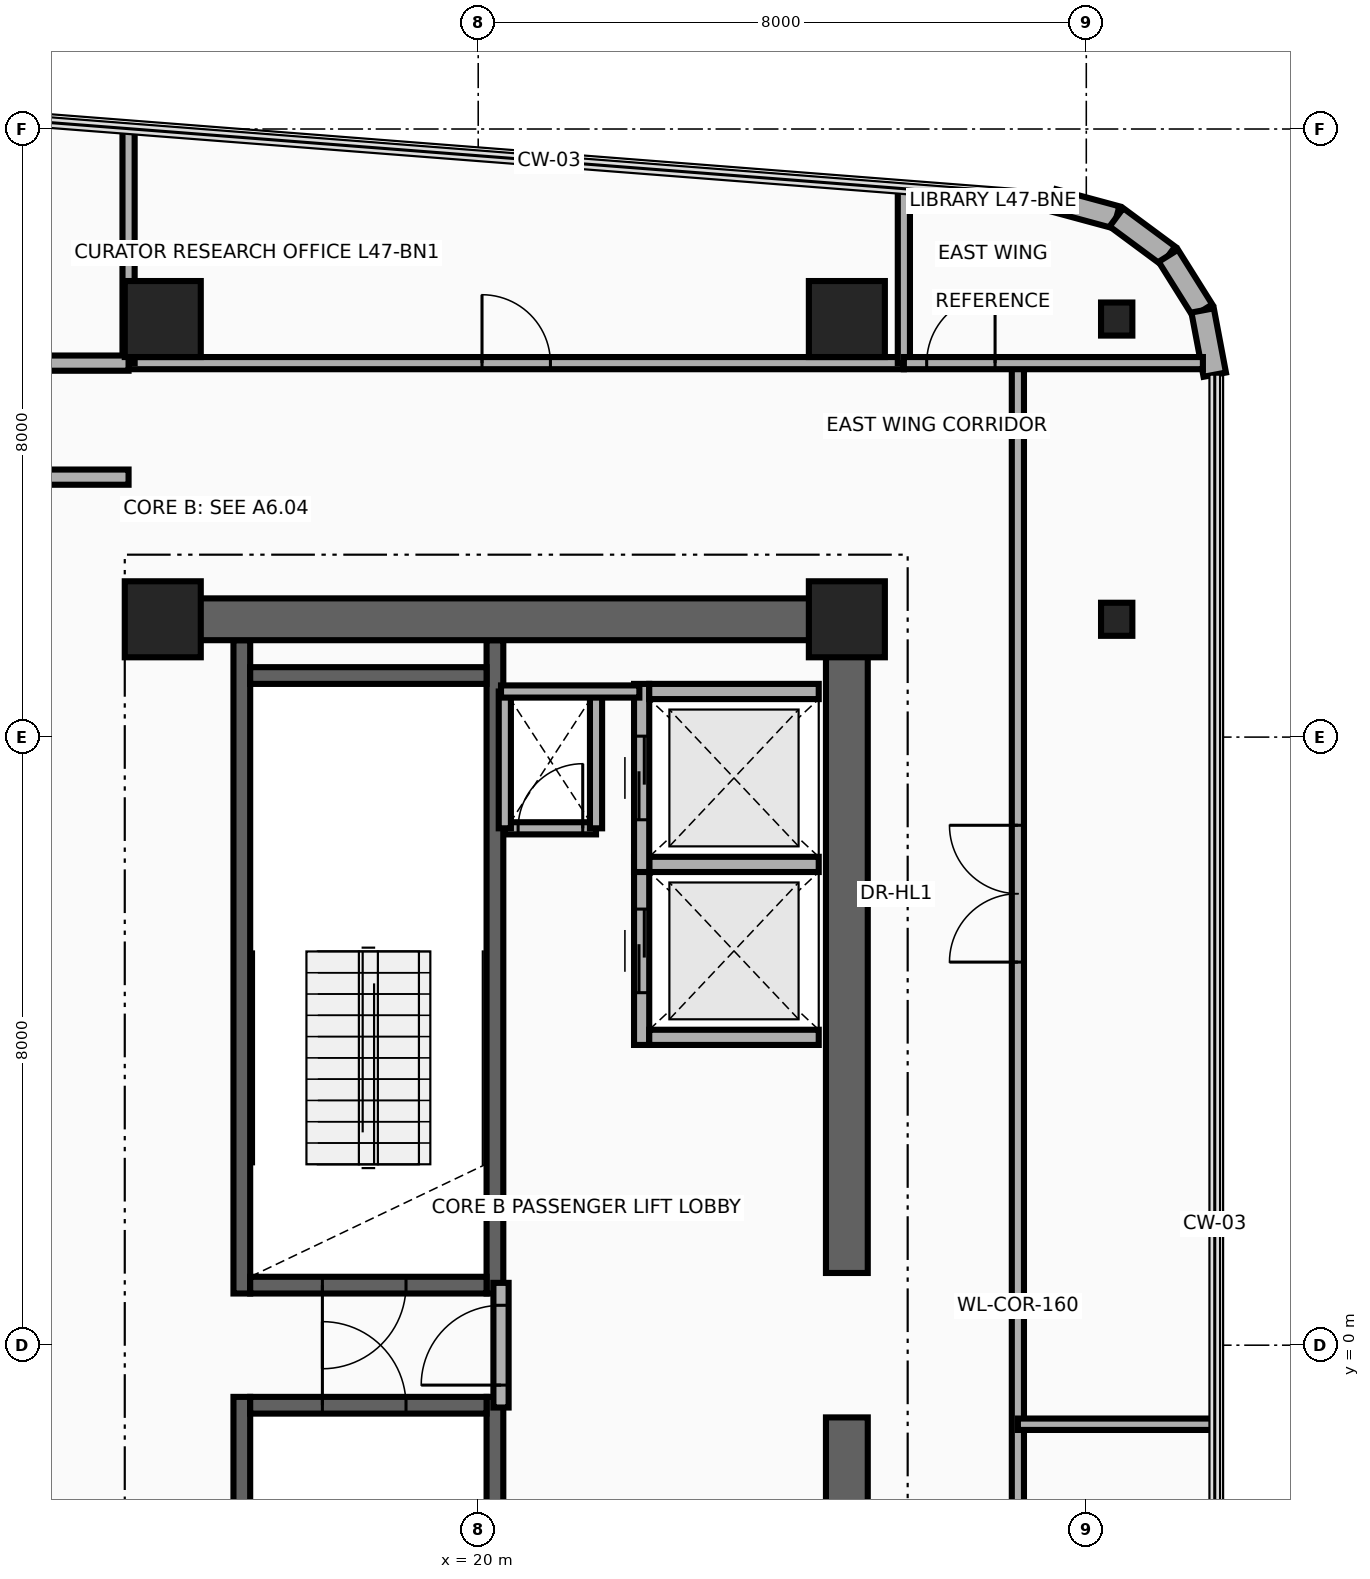
"""IFC4 building model, lengths in metres.
Left out: names, types, materials, properties, quantities, classifications, styles, units other than length and angle.
Written with IfcOpenShell. Run it as: python <this file> out.ifc"""

import sys

from ifc_helpers import new_model, si_unit, direction, frame, frame_2d, origin, origin_2d, place, context, subcontext, project, spatial, rectangle, i_section, extrude, source, transform, mapped, element, fill, save


model = new_model("IFC4")
c1 = context("Model", 3, precision=1e-05, world=origin(), true_north=direction((0.0, 1.0)))
c2 = subcontext(c1, "Body", "Model", "MODEL_VIEW")
j1 = project(units=[si_unit("LENGTHUNIT", "METRE"), si_unit("PLANEANGLEUNIT", "RADIAN")], contexts=[c1])
p1 = place(None, origin())
s1 = spatial("IfcSite", under=j1, at=p1, CompositionType="ELEMENT")
p2 = place(p1, origin())
s2 = spatial("IfcBuilding", under=s1, at=p2, CompositionType="ELEMENT")
p3 = place(p2, frame((0.0, 0.0, 184.45)))
s3 = spatial("IfcBuildingStorey", under=s2, at=p3, CompositionType="ELEMENT", Elevation=184.45)
for number, where, z_axis, x_axis in (
    (1, (16.89, 0.68, 0.0), (0.0, 0.0, 1.0), (0.0, 1.0, 0.0)),
    (2, (20.22, 0.68, 0.0), (0.0, 0.0, 1.0), (0.0, 1.0, 0.0)),
):
    element("IfcWall", number, at=place(p3, frame(where, z_axis=z_axis, x_axis=x_axis)), inside=s3, PredefinedType="SHEAR", context=c2, shape_type="SweptSolid", body=[
        extrude(rectangle(XDim=8.595, YDim=0.22, at=frame_2d((4.297, 0.0))), origin(), (0.0, 0.0, 1.0), 3.63),
    ])
p4 = place(p3, frame((17.0, 0.79, 0.0), z_axis=(0.0, 0.0, 1.0), x_axis=(1.0, 0.0, 0.0)))
e3 = element("IfcWall", 3, at=p4, inside=s3, PredefinedType="SHEAR", context=c2, shape_type="SweptSolid", body=[
    extrude(rectangle(XDim=3.11, YDim=0.22, at=frame_2d((1.555, 0.0))), origin(), (0.0, 0.0, 1.0), 3.63),
])
p5 = place(p4, frame((0.95, 0.0, 0.0)))
e4 = element("IfcOpeningElement", 4, at=p5, cuts=e3, PredefinedType="OPENING", context=c2, shape_type="SweptSolid", body=[
    extrude(rectangle(XDim=1.1, YDim=2.15, at=frame_2d((0.55, 1.075))), frame((0.0, 0.125, 0.0), z_axis=(0.0, -1.0, 0.0), x_axis=(1.0, 0.0, 0.0)), (0.0, 0.0, 1.0), 0.25),
])
p6 = place(p3, frame((17.0, 8.81, 0.0), z_axis=(0.0, 0.0, 1.0), x_axis=(1.0, 0.0, 0.0)))
e5 = element("IfcWall", 5, at=p6, inside=s3, PredefinedType="SHEAR", context=c2, shape_type="SweptSolid", body=[
    extrude(rectangle(XDim=3.11, YDim=0.22, at=frame_2d((1.555, 0.0))), origin(), (0.0, 0.0, 1.0), 3.63),
])
for number, where, z_axis, x_axis in (
    (6, (16.89, -9.275, 0.0), (0.0, 0.0, 1.0), (0.0, 1.0, 0.0)),
    (7, (20.22, -9.275, 0.0), (0.0, 0.0, 1.0), (0.0, 1.0, 0.0)),
):
    element("IfcWall", number, at=place(p3, frame(where, z_axis=z_axis, x_axis=x_axis)), inside=s3, PredefinedType="SHEAR", context=c2, shape_type="SweptSolid", body=[
        extrude(rectangle(XDim=8.595, YDim=0.22, at=frame_2d((4.297, 0.0))), origin(), (0.0, 0.0, 1.0), 3.63),
    ])
p7 = place(p3, frame((17.0, -0.79, 0.0), z_axis=(0.0, 0.0, 1.0), x_axis=(1.0, 0.0, 0.0)))
e8 = element("IfcWall", 8, at=p7, inside=s3, PredefinedType="SHEAR", context=c2, shape_type="SweptSolid", body=[
    extrude(rectangle(XDim=3.11, YDim=0.22, at=frame_2d((1.555, 0.0))), origin(), (0.0, 0.0, 1.0), 3.63),
])
p8 = place(p7, frame((0.95, 0.0, 0.0)))
e9 = element("IfcOpeningElement", 9, at=p8, cuts=e8, PredefinedType="OPENING", context=c2, shape_type="SweptSolid", body=[
    extrude(rectangle(XDim=1.1, YDim=2.15, at=frame_2d((0.55, 1.075))), frame((0.0, 0.125, 0.0), z_axis=(0.0, -1.0, 0.0), x_axis=(1.0, 0.0, 0.0)), (0.0, 0.0, 1.0), 0.25),
])
for number, where, z_axis, x_axis in (
    (10, (24.85, -9.825, 0.0), (0.0, 0.0, 1.0), (0.0, 1.0, 0.0)),
    (11, (24.85, 0.95, 0.0), (0.0, 0.0, 1.0), (0.0, 1.0, 0.0)),
):
    element("IfcWall", number, at=place(p3, frame(where, z_axis=z_axis, x_axis=x_axis)), inside=s3, PredefinedType="SHEAR", context=c2, shape_type="SweptSolid", body=[
        extrude(rectangle(XDim=8.875, YDim=0.55, at=frame_2d((4.438, 0.0))), origin(), (0.0, 0.0, 1.0), 3.63),
    ])
p9 = place(p3, frame((15.85, 9.55, 0.0), z_axis=(0.0, 0.0, 1.0), x_axis=(1.0, 0.0, 0.0)))
e12 = element("IfcWall", 12, at=p9, inside=s3, PredefinedType="SHEAR", context=c2, shape_type="SweptSolid", body=[
    extrude(rectangle(XDim=9.0, YDim=0.55, at=frame_2d((4.5, 0.0))), origin(), (0.0, 0.0, 1.0), 3.63),
])
m1 = source(origin(), c2, "Body", "SweptSolid", [
    extrude(rectangle(XDim=1.0, YDim=1.0, at=origin_2d()), origin(), (0.0, 0.0, 1.0), 3.95),
])
for number, where, z_axis, x_axis in (
    (13, (15.85, 9.55, 0.0), (0.0, 0.0, 1.0), (1.0, 0.0, 0.0)),
    (14, (24.85, 9.55, 0.0), (0.0, 0.0, 1.0), (1.0, 0.0, 0.0)),
):
    element("IfcColumn", number, at=place(p3, frame(where, z_axis=z_axis, x_axis=x_axis)), inside=s3, PredefinedType="COLUMN", context=c2, shape_type="MappedRepresentation", body=[
        mapped(m1, transform((0.0, 0.0, 0.0), x_axis=(1.0, 0.0, 0.0), y_axis=(0.0, 1.0, 0.0), z_axis=(0.0, 0.0, 1.0), scale=1.0)),
    ])
m2 = source(origin(), c2, "Body", "SweptSolid", [
    extrude(i_section(OverallWidth=0.412, OverallDepth=0.435, WebThickness=0.036, FlangeThickness=0.057, at=origin_2d()), origin(), (0.0, 0.0, 1.0), 3.95),
])
p10 = place(p3, frame((28.4, 9.55, 0.0), z_axis=(0.0, 0.0, 1.0), x_axis=(1.0, 0.0, 0.0)))
e15 = element("IfcColumn", 15, at=p10, inside=s3, PredefinedType="COLUMN", context=c2, shape_type="MappedRepresentation", body=[
    mapped(m2, transform((0.0, 0.0, 0.0), x_axis=(1.0, 0.0, 0.0), y_axis=(0.0, 1.0, 0.0), z_axis=(0.0, 0.0, 1.0), scale=1.0)),
])
for number, where, z_axis, x_axis in (
    (16, (15.85, 13.5, 0.0), (0.0, 0.0, 1.0), (1.0, 0.0, 0.0)),
    (17, (24.85, 13.5, 0.0), (0.0, 0.0, 1.0), (1.0, 0.0, 0.0)),
):
    element("IfcColumn", number, at=place(p3, frame(where, z_axis=z_axis, x_axis=x_axis)), inside=s3, PredefinedType="COLUMN", context=c2, shape_type="MappedRepresentation", body=[
        mapped(m1, transform((0.0, 0.0, 0.0), x_axis=(1.0, 0.0, 0.0), y_axis=(0.0, 1.0, 0.0), z_axis=(0.0, 0.0, 1.0), scale=1.0)),
    ])
p11 = place(p3, frame((28.4, 13.5, 0.0), z_axis=(0.0, 0.0, 1.0), x_axis=(1.0, 0.0, 0.0)))
e18 = element("IfcColumn", 18, at=p11, inside=s3, PredefinedType="COLUMN", context=c2, shape_type="MappedRepresentation", body=[
    mapped(m2, transform((0.0, 0.0, 0.0), x_axis=(1.0, 0.0, 0.0), y_axis=(0.0, 1.0, 0.0), z_axis=(0.0, 0.0, 1.0), scale=1.0)),
])
p12 = place(p3, frame((27.566, 15.062, 0.0), z_axis=(0.0, 0.0, 1.0), x_axis=(0.965357594382, -0.260930479187, 0.0)))
e19 = element("IfcWall", 19, at=p12, inside=s3, PredefinedType="SOLIDWALL", context=c2, shape_type="SweptSolid", body=[
    extrude(rectangle(XDim=0.86, YDim=0.3, at=frame_2d((0.43, 0.0))), origin(), (0.0, 0.0, 1.0), 3.63),
])
p13 = place(p3, frame((28.396, 14.838, 0.0), z_axis=(0.0, 0.0, 1.0), x_axis=(0.803847397988, -0.594835574548, 0.0)))
e20 = element("IfcWall", 20, at=p13, inside=s3, PredefinedType="SOLIDWALL", context=c2, shape_type="SweptSolid", body=[
    extrude(rectangle(XDim=0.849, YDim=0.3, at=frame_2d((0.425, 0.0))), origin(), (0.0, 0.0, 1.0), 3.63),
])
p14 = place(p3, frame((29.079, 14.333, 0.0), z_axis=(0.0, 0.0, 1.0), x_axis=(0.53134147342, -0.847157741288, 0.0)))
e21 = element("IfcWall", 21, at=p14, inside=s3, PredefinedType="SOLIDWALL", context=c2, shape_type="SweptSolid", body=[
    extrude(rectangle(XDim=0.85, YDim=0.3, at=frame_2d((0.425, 0.0))), origin(), (0.0, 0.0, 1.0), 3.63),
])
p15 = place(p3, frame((29.531, 13.613, 0.0), z_axis=(0.0, 0.0, 1.0), x_axis=(0.185402686284, -0.982662629756, 0.0)))
e22 = element("IfcWall", 22, at=p15, inside=s3, PredefinedType="SOLIDWALL", context=c2, shape_type="SweptSolid", body=[
    extrude(rectangle(XDim=0.86, YDim=0.3, at=frame_2d((0.43, 0.0))), origin(), (0.0, 0.0, 1.0), 3.63),
])
p16 = place(p3, frame((22.15, 3.95, 0.0), z_axis=(0.0, 0.0, 1.0), x_axis=(0.0, 1.0, 0.0)))
e23 = element("IfcWall", 23, at=p16, inside=s3, PredefinedType="MOVABLE", context=c2, shape_type="SweptSolid", body=[
    extrude(rectangle(XDim=2.475, YDim=0.2, at=frame_2d((1.238, 0.0))), origin(), (0.0, 0.0, 1.0), 3.63),
])
p17 = place(p16, frame((0.688, 0.0, 0.0)))
e24 = element("IfcOpeningElement", 24, at=p17, cuts=e23, PredefinedType="OPENING", context=c2, shape_type="SweptSolid", body=[
    extrude(rectangle(XDim=1.1, YDim=2.1, at=frame_2d((0.55, 1.05))), frame((0.0, 0.115, 0.0), z_axis=(0.0, -1.0, 0.0), x_axis=(1.0, 0.0, 0.0)), (0.0, 0.0, 1.0), 0.23),
])
for number, where, z_axis, x_axis in (
    (25, (22.25, 4.05, 0.0), (0.0, 0.0, 1.0), (1.0, 0.0, 0.0)),
    (26, (22.25, 6.325, 0.0), (0.0, 0.0, 1.0), (1.0, 0.0, 0.0)),
):
    element("IfcWall", number, at=place(p3, frame(where, z_axis=z_axis, x_axis=x_axis)), inside=s3, PredefinedType="MOVABLE", context=c2, shape_type="SweptSolid", body=[
        extrude(rectangle(XDim=2.23, YDim=0.2, at=frame_2d((1.115, 0.0))), origin(), (0.0, 0.0, 1.0), 3.63),
    ])
p18 = place(p3, frame((22.15, 6.225, 0.0), z_axis=(0.0, 0.0, 1.0), x_axis=(0.0, 1.0, 0.0)))
e27 = element("IfcWall", 27, at=p18, inside=s3, PredefinedType="MOVABLE", context=c2, shape_type="SweptSolid", body=[
    extrude(rectangle(XDim=2.475, YDim=0.2, at=frame_2d((1.237, 0.0))), origin(), (0.0, 0.0, 1.0), 3.63),
])
p19 = place(p18, frame((0.688, 0.0, 0.0)))
e28 = element("IfcOpeningElement", 28, at=p19, cuts=e27, PredefinedType="OPENING", context=c2, shape_type="SweptSolid", body=[
    extrude(rectangle(XDim=1.1, YDim=2.1, at=frame_2d((0.55, 1.05))), frame((0.0, 0.115, 0.0), z_axis=(0.0, -1.0, 0.0), x_axis=(1.0, 0.0, 0.0)), (0.0, 0.0, 1.0), 0.23),
])
p20 = place(p3, frame((22.25, 8.6, 0.0), z_axis=(0.0, 0.0, 1.0), x_axis=(1.0, 0.0, 0.0)))
e29 = element("IfcWall", 29, at=p20, inside=s3, PredefinedType="MOVABLE", context=c2, shape_type="SweptSolid", body=[
    extrude(rectangle(XDim=2.23, YDim=0.2, at=frame_2d((1.115, 0.0))), origin(), (0.0, 0.0, 1.0), 3.63),
])
p21 = place(p3, frame((20.3, -0.82, 0.0), z_axis=(0.0, 0.0, 1.0), x_axis=(0.0, 1.0, 0.0)))
e30 = element("IfcWall", 30, at=p21, inside=s3, PredefinedType="PARTITIONING", context=c2, shape_type="SweptSolid", body=[
    extrude(rectangle(XDim=1.64, YDim=0.2, at=frame_2d((0.82, 0.0))), origin(), (0.0, 0.0, 1.0), 3.63),
])
p22 = place(p21, frame((0.295, 0.0, 0.0)))
e31 = element("IfcOpeningElement", 31, at=p22, cuts=e30, PredefinedType="OPENING", context=c2, shape_type="SweptSolid", body=[
    extrude(rectangle(XDim=1.05, YDim=2.15, at=frame_2d((0.525, 1.075))), frame((0.0, 0.115, 0.0), z_axis=(0.0, -1.0, 0.0), x_axis=(1.0, 0.0, 0.0)), (0.0, 0.0, 1.0), 0.23),
])
p23 = place(p3, frame((20.35, 6.8, 0.0), z_axis=(0.0, 0.0, 1.0), x_axis=(1.0, 0.0, 0.0)))
e32 = element("IfcWall", 32, at=p23, inside=s3, PredefinedType="PARTITIONING", context=c2, shape_type="SweptSolid", body=[
    extrude(rectangle(XDim=1.2, YDim=0.16, at=frame_2d((0.6, 0.0))), origin(), (0.0, 0.0, 1.0), 3.63),
])
p24 = place(p23, frame((0.175, 0.0, 0.0)))
e33 = element("IfcOpeningElement", 33, at=p24, cuts=e32, PredefinedType="OPENING", context=c2, shape_type="SweptSolid", body=[
    extrude(rectangle(XDim=0.85, YDim=2.05, at=frame_2d((0.425, 1.025))), frame((0.0, 0.095, 0.0), z_axis=(0.0, -1.0, 0.0), x_axis=(1.0, 0.0, 0.0)), (0.0, 0.0, 1.0), 0.19),
])
for number, where, z_axis, x_axis in (
    (34, (21.55, 6.8, 0.0), (0.0, 0.0, 1.0), (0.0, 1.0, 0.0)),
    (35, (20.35, 6.8, 0.0), (0.0, 0.0, 1.0), (0.0, 1.0, 0.0)),
):
    element("IfcWall", number, at=place(p3, frame(where, z_axis=z_axis, x_axis=x_axis)), inside=s3, PredefinedType="PARTITIONING", context=c2, shape_type="SweptSolid", body=[
        extrude(rectangle(XDim=1.8, YDim=0.16, at=frame_2d((0.9, 0.0))), origin(), (0.0, 0.0, 1.0), 3.63),
    ])
p25 = place(p3, frame((20.3, 8.6, 0.0), z_axis=(0.0, 0.0, 1.0), x_axis=(1.0, 0.0, 0.0)))
e36 = element("IfcWall", 36, at=p25, inside=s3, PredefinedType="PARTITIONING", context=c2, shape_type="SweptSolid", body=[
    extrude(rectangle(XDim=1.82, YDim=0.16, at=frame_2d((0.91, 0.0))), origin(), (0.0, 0.0, 1.0), 3.63),
])
p26 = place(p3, frame((15.4, 12.92, 0.0), z_axis=(0.0, 0.0, 1.0), x_axis=(1.0, 0.0, 0.0)))
e37 = element("IfcWall", 37, at=p26, inside=s3, PredefinedType="PARTITIONING", context=c2, shape_type="SweptSolid", body=[
    extrude(rectangle(XDim=10.2, YDim=0.16, at=frame_2d((5.1, 0.0))), origin(), (0.0, 0.0, 1.0), 3.004),
])
p27 = place(p26, frame((4.65, 0.0, 0.0)))
e38 = element("IfcOpeningElement", 38, at=p27, cuts=e37, PredefinedType="OPENING", context=c2, shape_type="SweptSolid", body=[
    extrude(rectangle(XDim=0.9, YDim=2.1, at=frame_2d((0.45, 1.05))), frame((0.0, 0.095, 0.0), z_axis=(0.0, -1.0, 0.0), x_axis=(1.0, 0.0, 0.0)), (0.0, 0.0, 1.0), 0.19),
])
p28 = place(p3, frame((15.4, 12.92, 0.0), z_axis=(0.0, 0.0, 1.0), x_axis=(0.0, 1.0, 0.0)))
e39 = element("IfcWall", 39, at=p28, inside=s3, PredefinedType="PARTITIONING", context=c2, shape_type="SweptSolid", body=[
    extrude(rectangle(XDim=3.084, YDim=0.16, at=frame_2d((1.542, 0.0))), origin(), (0.0, 0.0, 1.0), 2.665),
])
p29 = place(p3, frame((25.6, 12.92, 0.0), z_axis=(0.0, 0.0, 1.0), x_axis=(0.0, 1.0, 0.0)))
e40 = element("IfcWall", 40, at=p29, inside=s3, PredefinedType="PARTITIONING", context=c2, shape_type="SweptSolid", body=[
    extrude(rectangle(XDim=2.295, YDim=0.16, at=frame_2d((1.147, 0.0))), origin(), (0.0, 0.0, 1.0), 2.665),
])
p30 = place(p3, frame((27.1, -11.89, 0.0), z_axis=(0.0, 0.0, 1.0), x_axis=(0.0, 1.0, 0.0)))
e41 = element("IfcWall", 41, at=p30, inside=s3, PredefinedType="PARTITIONING", context=c2, shape_type="SweptSolid", body=[
    extrude(rectangle(XDim=24.81, YDim=0.16, at=frame_2d((12.405, 0.0))), origin(), (0.0, 0.0, 1.0), 2.665),
])
p31 = place(p30, frame((4.525, 0.0, 0.0)))
e42 = element("IfcOpeningElement", 42, at=p31, cuts=e41, PredefinedType="OPENING", context=c2, shape_type="SweptSolid", body=[
    extrude(rectangle(XDim=1.8, YDim=2.15, at=frame_2d((0.9, 1.075))), frame((0.0, 0.095, 0.0), z_axis=(0.0, -1.0, 0.0), x_axis=(1.0, 0.0, 0.0)), (0.0, 0.0, 1.0), 0.19),
])
p32 = place(p30, frame((16.93, 0.0, 0.0)))
e43 = element("IfcOpeningElement", 43, at=p32, cuts=e41, PredefinedType="OPENING", context=c2, shape_type="SweptSolid", body=[
    extrude(rectangle(XDim=1.8, YDim=2.15, at=frame_2d((0.9, 1.075))), frame((0.0, 0.095, 0.0), z_axis=(0.0, -1.0, 0.0), x_axis=(1.0, 0.0, 0.0)), (0.0, 0.0, 1.0), 0.19),
])
p33 = place(p3, frame((25.6, 12.92, 0.0), z_axis=(0.0, 0.0, 1.0), x_axis=(1.0, 0.0, 0.0)))
e44 = element("IfcWall", 44, at=p33, inside=s3, PredefinedType="PARTITIONING", context=c2, shape_type="SweptSolid", body=[
    extrude(rectangle(XDim=3.934, YDim=0.16, at=frame_2d((1.967, 0.0))), origin(), (0.0, 0.0, 1.0), 3.076),
])
p34 = place(p33, frame((0.3, 0.0, 0.0)))
e45 = element("IfcOpeningElement", 45, at=p34, cuts=e44, PredefinedType="OPENING", context=c2, shape_type="SweptSolid", body=[
    extrude(rectangle(XDim=0.9, YDim=2.1, at=frame_2d((0.45, 1.05))), frame((0.0, 0.095, 0.0), z_axis=(0.0, -1.0, 0.0), x_axis=(1.0, 0.0, 0.0)), (0.0, 0.0, 1.0), 0.19),
])
p35 = place(p3, frame((27.1, -1.04, 0.0), z_axis=(0.0, 0.0, 1.0), x_axis=(1.0, 0.0, 0.0)))
e46 = element("IfcWall", 46, at=p35, inside=s3, PredefinedType="PARTITIONING", context=c2, shape_type="SweptSolid", body=[
    extrude(rectangle(XDim=2.59, YDim=0.15, at=frame_2d((1.295, 0.0))), origin(), (0.0, 0.0, 1.0), 3.076),
])
for number, where, z_axis, x_axis in (
    (47, (13.42, 12.92, 0.0), (0.0, 0.0, 1.0), (1.0, 0.0, 0.0)),
    (48, (13.42, 11.42, 0.0), (0.0, 0.0, 1.0), (1.0, 0.0, 0.0)),
):
    element("IfcWall", number, at=place(p3, frame(where, z_axis=z_axis, x_axis=x_axis)), inside=s3, PredefinedType="PARTITIONING", context=c2, shape_type="SweptSolid", body=[
        extrude(rectangle(XDim=1.98, YDim=0.2, at=frame_2d((0.99, 0.0))), origin(), (0.0, 0.0, 1.0), 3.004),
    ])
p36 = place(p17, origin())
e49 = element("IfcDoor", 49, at=p36, inside=s3, OperationType="DOUBLE_DOOR_SLIDING", PredefinedType="DOOR", context=c2, shape_type="SweptSolid", body=[
    extrude(rectangle(XDim=1.1, YDim=2.1, at=frame_2d((0.55, 1.05))), frame((0.0, 0.025, 0.0), z_axis=(0.0, -1.0, 0.0), x_axis=(1.0, 0.0, 0.0)), (0.0, 0.0, 1.0), 0.05),
])
fill(e24, e49)
p37 = place(p19, origin())
e50 = element("IfcDoor", 50, at=p37, inside=s3, OperationType="DOUBLE_DOOR_SLIDING", PredefinedType="DOOR", context=c2, shape_type="SweptSolid", body=[
    extrude(rectangle(XDim=1.1, YDim=2.1, at=frame_2d((0.55, 1.05))), frame((0.0, 0.025, 0.0), z_axis=(0.0, -1.0, 0.0), x_axis=(1.0, 0.0, 0.0)), (0.0, 0.0, 1.0), 0.05),
])
fill(e28, e50)
p38 = place(p22, origin())
e51 = element("IfcDoor", 51, at=p38, inside=s3, OperationType="SINGLE_SWING_RIGHT", PredefinedType="DOOR", context=c2, shape_type="SweptSolid", body=[
    extrude(rectangle(XDim=1.05, YDim=2.15, at=frame_2d((0.525, 1.075))), frame((0.0, 0.025, 0.0), z_axis=(0.0, -1.0, 0.0), x_axis=(1.0, 0.0, 0.0)), (0.0, 0.0, 1.0), 0.05),
])
fill(e31, e51)
p39 = place(p5, frame((1.1, 0.0, 0.0), z_axis=(0.0, 0.0, 1.0), x_axis=(-1.0, 0.0, 0.0)))
e52 = element("IfcDoor", 52, at=p39, inside=s3, OperationType="SINGLE_SWING_LEFT", PredefinedType="DOOR", context=c2, shape_type="SweptSolid", body=[
    extrude(rectangle(XDim=1.1, YDim=2.15, at=frame_2d((0.55, 1.075))), frame((0.0, 0.025, 0.0), z_axis=(0.0, -1.0, 0.0), x_axis=(1.0, 0.0, 0.0)), (0.0, 0.0, 1.0), 0.05),
])
fill(e4, e52)
p40 = place(p8, origin())
e53 = element("IfcDoor", 53, at=p40, inside=s3, OperationType="SINGLE_SWING_RIGHT", PredefinedType="DOOR", context=c2, shape_type="SweptSolid", body=[
    extrude(rectangle(XDim=1.1, YDim=2.15, at=frame_2d((0.55, 1.075))), frame((0.0, 0.025, 0.0), z_axis=(0.0, -1.0, 0.0), x_axis=(1.0, 0.0, 0.0)), (0.0, 0.0, 1.0), 0.05),
])
fill(e9, e53)
p41 = place(p24, origin())
e54 = element("IfcDoor", 54, at=p41, inside=s3, OperationType="SINGLE_SWING_LEFT", PredefinedType="DOOR", context=c2, shape_type="SweptSolid", body=[
    extrude(rectangle(XDim=0.85, YDim=2.05, at=frame_2d((0.425, 1.025))), frame((0.0, 0.025, 0.0), z_axis=(0.0, -1.0, 0.0), x_axis=(1.0, 0.0, 0.0)), (0.0, 0.0, 1.0), 0.05),
])
fill(e33, e54)
p42 = place(p27, origin())
e55 = element("IfcDoor", 55, at=p42, inside=s3, OperationType="SINGLE_SWING_RIGHT", PredefinedType="DOOR", context=c2, shape_type="SweptSolid", body=[
    extrude(rectangle(XDim=0.9, YDim=2.1, at=frame_2d((0.45, 1.05))), frame((0.0, 0.025, 0.0), z_axis=(0.0, -1.0, 0.0), x_axis=(1.0, 0.0, 0.0)), (0.0, 0.0, 1.0), 0.05),
])
fill(e38, e55)
p43 = place(p34, origin())
e56 = element("IfcDoor", 56, at=p43, inside=s3, OperationType="SINGLE_SWING_RIGHT", PredefinedType="DOOR", context=c2, shape_type="SweptSolid", body=[
    extrude(rectangle(XDim=0.9, YDim=2.1, at=frame_2d((0.45, 1.05))), frame((0.0, 0.025, 0.0), z_axis=(0.0, -1.0, 0.0), x_axis=(1.0, 0.0, 0.0)), (0.0, 0.0, 1.0), 0.05),
])
fill(e45, e56)
p44 = place(p32, origin())
e57 = element("IfcDoor", 57, at=p44, inside=s3, OperationType="DOUBLE_DOOR_SINGLE_SWING", PredefinedType="DOOR", context=c2, shape_type="SweptSolid", body=[
    extrude(rectangle(XDim=1.8, YDim=2.15, at=frame_2d((0.9, 1.075))), frame((0.0, 0.025, 0.0), z_axis=(0.0, -1.0, 0.0), x_axis=(1.0, 0.0, 0.0)), (0.0, 0.0, 1.0), 0.05),
])
fill(e43, e57)
save(model, sys.argv[1])
